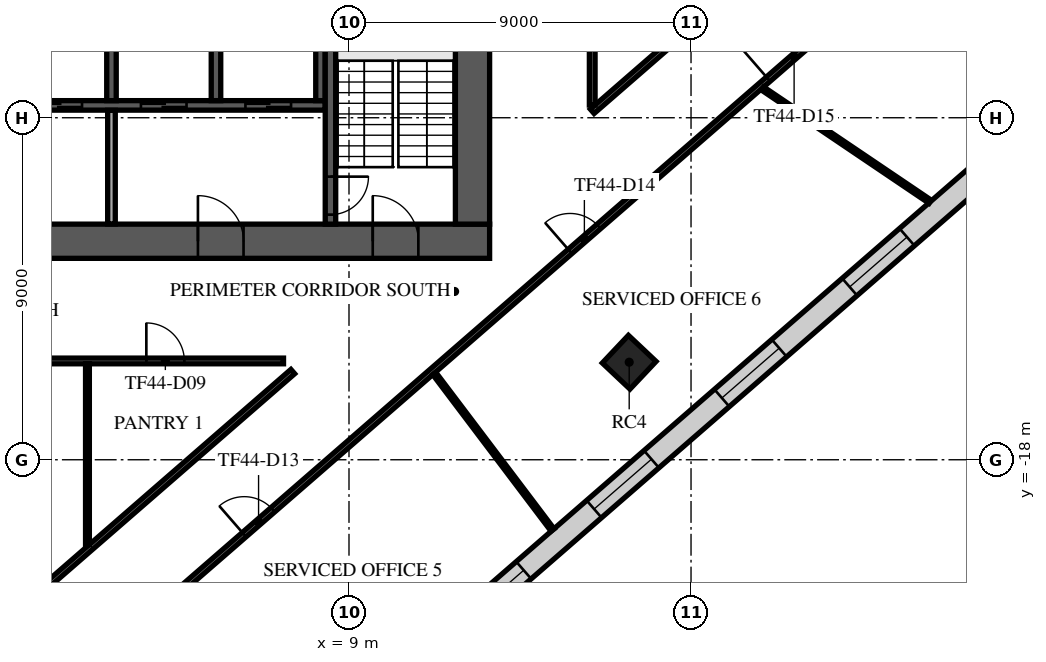
"""IFC4 building model, lengths in metres.
Left out: names, types, materials, properties, quantities, classifications, styles, units other than length and angle.
Written with IfcOpenShell. Run it as: python <this file> out.ifc"""

import sys

from ifc_helpers import new_model, si_unit, direction, frame, frame_2d, origin, origin_2d, place, context, subcontext, project, spatial, rectangle, extrude, element, fill, save


model = new_model("IFC4")
c1 = context("Model", 3, precision=1e-05, world=origin(), true_north=direction((0.0, 1.0)))
c2 = subcontext(c1, "Body", "Model", "MODEL_VIEW")
j1 = project(units=[si_unit("LENGTHUNIT", "METRE"), si_unit("PLANEANGLEUNIT", "RADIAN")], contexts=[c1])
p1 = place(None, origin())
s1 = spatial("IfcSite", under=j1, at=p1, CompositionType="ELEMENT")
p2 = place(p1, origin())
s2 = spatial("IfcBuilding", under=s1, at=p2, CompositionType="ELEMENT")
p3 = place(p2, frame((0.0, 0.0, 189.3)))
s3 = spatial("IfcBuildingStorey", under=s2, at=p3, CompositionType="ELEMENT", Elevation=189.3)
p4 = place(p3, frame((16.373, -15.433, -0.38), z_axis=(0.0, 0.0, 1.0), x_axis=(0.685916152371, 0.727680583715, 0.0)))
e1 = element("IfcColumn", 1, at=p4, inside=s3, PredefinedType="COLUMN", context=c2, shape_type="SweptSolid", body=[
    extrude(rectangle(XDim=1.0, YDim=1.0, at=origin_2d()), origin(), (0.0, 0.0, 1.0), 4.38),
])
p5 = place(p3, frame((-12.7, -12.25, 0.0), z_axis=(0.0, 0.0, 1.0), x_axis=(1.0, 0.0, 0.0)))
e2 = element("IfcWall", 2, at=p5, inside=s3, PredefinedType="SHEAR", context=c2, shape_type="SweptSolid", body=[
    extrude(rectangle(XDim=25.4, YDim=0.9, at=frame_2d((12.7, 0.0))), origin(), (0.0, 0.0, 1.0), 3.62),
])
p6 = place(p5, frame((7.6, 0.0, 0.0)))
e3 = element("IfcOpeningElement", 3, at=p6, cuts=e2, PredefinedType="OPENING", context=c2, shape_type="SweptSolid", body=[
    extrude(rectangle(XDim=2.0, YDim=2.1, at=frame_2d((1.0, 1.05))), frame((0.0, 0.46, 0.0), z_axis=(0.0, -1.0, 0.0), x_axis=(1.0, 0.0, 0.0)), (0.0, 0.0, 1.0), 0.92),
])
p7 = place(p5, frame((17.725, 0.0, 0.0)))
e4 = element("IfcOpeningElement", 4, at=p7, cuts=e2, PredefinedType="OPENING", context=c2, shape_type="SweptSolid", body=[
    extrude(rectangle(XDim=1.2, YDim=2.1, at=frame_2d((0.6, 1.05))), frame((0.0, 0.46, 0.0), z_axis=(0.0, -1.0, 0.0), x_axis=(1.0, 0.0, 0.0)), (0.0, 0.0, 1.0), 0.92),
])
p8 = place(p5, frame((1.875, 0.0, 0.0)))
e5 = element("IfcOpeningElement", 5, at=p8, cuts=e2, PredefinedType="OPENING", context=c2, shape_type="SweptSolid", body=[
    extrude(rectangle(XDim=1.2, YDim=2.1, at=frame_2d((0.6, 1.05))), frame((0.0, 0.46, 0.0), z_axis=(0.0, -1.0, 0.0), x_axis=(1.0, 0.0, 0.0)), (0.0, 0.0, 1.0), 0.92),
])
p9 = place(p5, frame((22.325, 0.0, 0.0)))
e6 = element("IfcOpeningElement", 6, at=p9, cuts=e2, PredefinedType="OPENING", context=c2, shape_type="SweptSolid", body=[
    extrude(rectangle(XDim=1.2, YDim=2.1, at=frame_2d((0.6, 1.05))), frame((0.0, 0.46, 0.0), z_axis=(0.0, -1.0, 0.0), x_axis=(1.0, 0.0, 0.0)), (0.0, 0.0, 1.0), 0.92),
])
p10 = place(p3, frame((12.25, -11.8, 0.0), z_axis=(0.0, 0.0, 1.0), x_axis=(0.0, 1.0, 0.0)))
e7 = element("IfcWall", 7, at=p10, inside=s3, PredefinedType="SHEAR", context=c2, shape_type="SweptSolid", body=[
    extrude(rectangle(XDim=23.6, YDim=0.9, at=frame_2d((11.8, 0.0))), origin(), (0.0, 0.0, 1.0), 3.62),
])
p11 = place(p10, frame((10.6, 0.0, 0.0)))
e8 = element("IfcOpeningElement", 8, at=p11, cuts=e7, PredefinedType="OPENING", context=c2, shape_type="SweptSolid", body=[
    extrude(rectangle(XDim=2.4, YDim=2.4, at=frame_2d((1.2, 1.2))), frame((0.0, 0.46, 0.0), z_axis=(0.0, -1.0, 0.0), x_axis=(1.0, 0.0, 0.0)), (0.0, 0.0, 1.0), 0.92),
])
p12 = place(p3, frame((-2.875, -8.675, 0.0), z_axis=(0.0, 0.0, 1.0), x_axis=(1.0, 0.0, 0.0)))
e9 = element("IfcWall", 9, at=p12, inside=s3, PredefinedType="SOLIDWALL", context=c2, shape_type="SweptSolid", body=[
    extrude(rectangle(XDim=11.25, YDim=0.25, at=frame_2d((5.625, 0.0))), origin(), (0.0, 0.0, 1.0), 3.62),
])
p13 = place(p12, frame((0.9, 0.0, 0.0)))
e10 = element("IfcOpeningElement", 10, at=p13, cuts=e9, PredefinedType="OPENING", context=c2, shape_type="SweptSolid", body=[
    extrude(rectangle(XDim=1.2, YDim=2.1, at=frame_2d((0.6, 1.05))), frame((0.0, 0.135, 0.0), z_axis=(0.0, -1.0, 0.0), x_axis=(1.0, 0.0, 0.0)), (0.0, 0.0, 1.0), 0.27),
])
p14 = place(p12, frame((3.65, 0.0, 0.0)))
e11 = element("IfcOpeningElement", 11, at=p14, cuts=e9, PredefinedType="OPENING", context=c2, shape_type="SweptSolid", body=[
    extrude(rectangle(XDim=1.2, YDim=2.1, at=frame_2d((0.6, 1.05))), frame((0.0, 0.135, 0.0), z_axis=(0.0, -1.0, 0.0), x_axis=(1.0, 0.0, 0.0)), (0.0, 0.0, 1.0), 0.27),
])
p15 = place(p12, frame((6.4, 0.0, 0.0)))
e12 = element("IfcOpeningElement", 12, at=p15, cuts=e9, PredefinedType="OPENING", context=c2, shape_type="SweptSolid", body=[
    extrude(rectangle(XDim=1.2, YDim=2.1, at=frame_2d((0.6, 1.05))), frame((0.0, 0.135, 0.0), z_axis=(0.0, -1.0, 0.0), x_axis=(1.0, 0.0, 0.0)), (0.0, 0.0, 1.0), 0.27),
])
p16 = place(p12, frame((9.15, 0.0, 0.0)))
e13 = element("IfcOpeningElement", 13, at=p16, cuts=e9, PredefinedType="OPENING", context=c2, shape_type="SweptSolid", body=[
    extrude(rectangle(XDim=1.2, YDim=2.1, at=frame_2d((0.6, 1.05))), frame((0.0, 0.135, 0.0), z_axis=(0.0, -1.0, 0.0), x_axis=(1.0, 0.0, 0.0)), (0.0, 0.0, 1.0), 0.27),
])
for number, where, z_axis, x_axis in (
    (14, (2.75, -8.55, 0.0), (0.0, 0.0, 1.0), (0.0, 1.0, 0.0)),
    (15, (5.5, -8.55, 0.0), (0.0, 0.0, 1.0), (0.0, 1.0, 0.0)),
    (16, (8.25, -8.55, 0.0), (0.0, 0.0, 1.0), (0.0, 1.0, 0.0)),
):
    element("IfcWall", number, at=place(p3, frame(where, z_axis=z_axis, x_axis=x_axis)), inside=s3, PredefinedType="SOLIDWALL", context=c2, shape_type="SweptSolid", body=[
        extrude(rectangle(XDim=2.7, YDim=0.25, at=frame_2d((1.35, 0.0))), origin(), (0.0, 0.0, 1.0), 3.62),
    ])
p17 = place(p3, frame((8.512, -4.55, 0.0), z_axis=(0.0, 0.0, 1.0), x_axis=(0.0, -1.0, 0.0)))
e17 = element("IfcWall", 17, at=p17, inside=s3, PredefinedType="SOLIDWALL", context=c2, shape_type="SweptSolid", body=[
    extrude(rectangle(XDim=7.25, YDim=0.275, at=frame_2d((3.625, 0.0))), origin(), (0.0, 0.0, 1.0), 3.62),
])
p18 = place(p17, frame((6.0, 0.0, 0.0)))
e18 = element("IfcOpeningElement", 18, at=p18, cuts=e17, PredefinedType="OPENING", context=c2, shape_type="SweptSolid", body=[
    extrude(rectangle(XDim=1.0, YDim=2.1, at=frame_2d((0.5, 1.05))), frame((0.0, 0.147, 0.0), z_axis=(0.0, -1.0, 0.0), x_axis=(1.0, 0.0, 0.0)), (0.0, 0.0, 1.0), 0.295),
])
p19 = place(p3, frame((2.75, -11.795, 0.0), z_axis=(0.0, 0.0, 1.0), x_axis=(0.0, 1.0, 0.0)))
e19 = element("IfcWall", 19, at=p19, inside=s3, PredefinedType="PARTITIONING", context=c2, shape_type="SweptSolid", body=[
    extrude(rectangle(XDim=2.99, YDim=0.2, at=frame_2d((1.495, 0.0))), origin(), (0.0, 0.0, 1.0), 3.62),
])
p20 = place(p3, frame((-2.286, -34.715, 0.0), z_axis=(0.0, 0.0, 1.0), x_axis=(0.754708272811, 0.656060532993, 0.0)))
e20 = element("IfcWall", 20, at=p20, inside=s3, PredefinedType="STANDARD", context=c2, shape_type="SweptSolid", body=[
    extrude(rectangle(XDim=49.0, YDim=0.6, at=frame_2d((24.5, 0.0))), origin(), (0.0, 0.0, 1.0), 3.62),
])
p21 = place(p20, frame((1.227, 0.0, 0.9)))
e21 = element("IfcOpeningElement", 21, at=p21, cuts=e20, PredefinedType="OPENING", context=c2, shape_type="SweptSolid", body=[
    extrude(rectangle(XDim=2.0, YDim=2.1, at=frame_2d((1.0, 1.05))), frame((0.0, 0.31, 0.0), z_axis=(0.0, -1.0, 0.0), x_axis=(1.0, 0.0, 0.0)), (0.0, 0.0, 1.0), 0.62),
])
p22 = place(p20, frame((5.682, 0.0, 0.9)))
e22 = element("IfcOpeningElement", 22, at=p22, cuts=e20, PredefinedType="OPENING", context=c2, shape_type="SweptSolid", body=[
    extrude(rectangle(XDim=2.0, YDim=2.1, at=frame_2d((1.0, 1.05))), frame((0.0, 0.31, 0.0), z_axis=(0.0, -1.0, 0.0), x_axis=(1.0, 0.0, 0.0)), (0.0, 0.0, 1.0), 0.62),
])
p23 = place(p20, frame((10.136, 0.0, 0.9)))
e23 = element("IfcOpeningElement", 23, at=p23, cuts=e20, PredefinedType="OPENING", context=c2, shape_type="SweptSolid", body=[
    extrude(rectangle(XDim=2.0, YDim=2.1, at=frame_2d((1.0, 1.05))), frame((0.0, 0.31, 0.0), z_axis=(0.0, -1.0, 0.0), x_axis=(1.0, 0.0, 0.0)), (0.0, 0.0, 1.0), 0.62),
])
p24 = place(p20, frame((14.591, 0.0, 0.9)))
e24 = element("IfcOpeningElement", 24, at=p24, cuts=e20, PredefinedType="OPENING", context=c2, shape_type="SweptSolid", body=[
    extrude(rectangle(XDim=2.0, YDim=2.1, at=frame_2d((1.0, 1.05))), frame((0.0, 0.31, 0.0), z_axis=(0.0, -1.0, 0.0), x_axis=(1.0, 0.0, 0.0)), (0.0, 0.0, 1.0), 0.62),
])
p25 = place(p20, frame((19.045, 0.0, 0.9)))
e25 = element("IfcOpeningElement", 25, at=p25, cuts=e20, PredefinedType="OPENING", context=c2, shape_type="SweptSolid", body=[
    extrude(rectangle(XDim=2.0, YDim=2.1, at=frame_2d((1.0, 1.05))), frame((0.0, 0.31, 0.0), z_axis=(0.0, -1.0, 0.0), x_axis=(1.0, 0.0, 0.0)), (0.0, 0.0, 1.0), 0.62),
])
p26 = place(p20, frame((23.5, 0.0, 0.9)))
e26 = element("IfcOpeningElement", 26, at=p26, cuts=e20, PredefinedType="OPENING", context=c2, shape_type="SweptSolid", body=[
    extrude(rectangle(XDim=2.0, YDim=2.1, at=frame_2d((1.0, 1.05))), frame((0.0, 0.31, 0.0), z_axis=(0.0, -1.0, 0.0), x_axis=(1.0, 0.0, 0.0)), (0.0, 0.0, 1.0), 0.62),
])
p27 = place(p20, frame((27.955, 0.0, 0.9)))
e27 = element("IfcOpeningElement", 27, at=p27, cuts=e20, PredefinedType="OPENING", context=c2, shape_type="SweptSolid", body=[
    extrude(rectangle(XDim=2.0, YDim=2.1, at=frame_2d((1.0, 1.05))), frame((0.0, 0.31, 0.0), z_axis=(0.0, -1.0, 0.0), x_axis=(1.0, 0.0, 0.0)), (0.0, 0.0, 1.0), 0.62),
])
p28 = place(p20, frame((32.409, 0.0, 0.9)))
e28 = element("IfcOpeningElement", 28, at=p28, cuts=e20, PredefinedType="OPENING", context=c2, shape_type="SweptSolid", body=[
    extrude(rectangle(XDim=2.0, YDim=2.1, at=frame_2d((1.0, 1.05))), frame((0.0, 0.31, 0.0), z_axis=(0.0, -1.0, 0.0), x_axis=(1.0, 0.0, 0.0)), (0.0, 0.0, 1.0), 0.62),
])
p29 = place(p20, frame((36.864, 0.0, 0.9)))
e29 = element("IfcOpeningElement", 29, at=p29, cuts=e20, PredefinedType="OPENING", context=c2, shape_type="SweptSolid", body=[
    extrude(rectangle(XDim=2.0, YDim=2.1, at=frame_2d((1.0, 1.05))), frame((0.0, 0.31, 0.0), z_axis=(0.0, -1.0, 0.0), x_axis=(1.0, 0.0, 0.0)), (0.0, 0.0, 1.0), 0.62),
])
p30 = place(p20, frame((41.318, 0.0, 0.9)))
e30 = element("IfcOpeningElement", 30, at=p30, cuts=e20, PredefinedType="OPENING", context=c2, shape_type="SweptSolid", body=[
    extrude(rectangle(XDim=2.0, YDim=2.1, at=frame_2d((1.0, 1.05))), frame((0.0, 0.31, 0.0), z_axis=(0.0, -1.0, 0.0), x_axis=(1.0, 0.0, 0.0)), (0.0, 0.0, 1.0), 0.62),
])
p31 = place(p20, frame((45.773, 0.0, 0.9)))
e31 = element("IfcOpeningElement", 31, at=p31, cuts=e20, PredefinedType="OPENING", context=c2, shape_type="SweptSolid", body=[
    extrude(rectangle(XDim=2.0, YDim=2.1, at=frame_2d((1.0, 1.05))), frame((0.0, 0.31, 0.0), z_axis=(0.0, -1.0, 0.0), x_axis=(1.0, 0.0, 0.0)), (0.0, 0.0, 1.0), 0.62),
])
p32 = place(p3, frame((-10.486, -15.4, 0.0), z_axis=(0.0, 0.0, 1.0), x_axis=(1.0, 0.0, 0.0)))
e32 = element("IfcWall", 32, at=p32, inside=s3, PredefinedType="PARTITIONING", context=c2, shape_type="SweptSolid", body=[
    extrude(rectangle(XDim=17.763, YDim=0.15, at=frame_2d((8.882, 0.0))), origin(), (0.0, 0.0, 1.0), 3.17),
])
p33 = place(p32, frame((14.154, 0.0, 0.0)))
e33 = element("IfcOpeningElement", 33, at=p33, cuts=e32, PredefinedType="OPENING", context=c2, shape_type="SweptSolid", body=[
    extrude(rectangle(XDim=1.0, YDim=2.1, at=frame_2d((0.5, 1.05))), frame((0.0, 0.085, 0.0), z_axis=(0.0, -1.0, 0.0), x_axis=(1.0, 0.0, 0.0)), (0.0, 0.0, 1.0), 0.17),
])
p34 = place(p3, frame((-2.631, -24.505, 0.0), z_axis=(0.0, 0.0, 1.0), x_axis=(0.754714526528, 0.656053338874, 0.0)))
e34 = element("IfcWall", 34, at=p34, inside=s3, PredefinedType="PARTITIONING", context=c2, shape_type="SweptSolid", body=[
    extrude(rectangle(XDim=13.452, YDim=0.15, at=frame_2d((6.726, 0.0))), origin(), (0.0, 0.0, 1.0), 3.17),
])
p35 = place(p34, frame((3.05, 0.0, 0.0)))
e35 = element("IfcOpeningElement", 35, at=p35, cuts=e34, PredefinedType="OPENING", context=c2, shape_type="SweptSolid", body=[
    extrude(rectangle(XDim=1.0, YDim=2.1, at=frame_2d((0.5, 1.05))), frame((0.0, 0.085, 0.0), z_axis=(0.0, -1.0, 0.0), x_axis=(1.0, 0.0, 0.0)), (0.0, 0.0, 1.0), 0.17),
])
p36 = place(p3, frame((-1.0, -26.268, 0.0), z_axis=(0.0, 0.0, 1.0), x_axis=(0.754711356604, 0.656056985492, 0.0)))
e36 = element("IfcWall", 36, at=p36, inside=s3, PredefinedType="PARTITIONING", context=c2, shape_type="SweptSolid", body=[
    extrude(rectangle(XDim=36.052, YDim=0.15, at=frame_2d((18.026, 0.0))), origin(), (0.0, 0.0, 1.0), 3.17),
])
p37 = place(p36, frame((9.598, 0.0, 0.0)))
e37 = element("IfcOpeningElement", 37, at=p37, cuts=e36, PredefinedType="OPENING", context=c2, shape_type="SweptSolid", body=[
    extrude(rectangle(XDim=1.0, YDim=2.1, at=frame_2d((0.5, 1.05))), frame((0.0, 0.085, 0.0), z_axis=(0.0, -1.0, 0.0), x_axis=(1.0, 0.0, 0.0)), (0.0, 0.0, 1.0), 0.17),
])
p38 = place(p36, frame((20.957, 0.0, 0.0)))
e38 = element("IfcOpeningElement", 38, at=p38, cuts=e36, PredefinedType="OPENING", context=c2, shape_type="SweptSolid", body=[
    extrude(rectangle(XDim=1.0, YDim=2.1, at=frame_2d((0.5, 1.05))), frame((0.0, 0.085, 0.0), z_axis=(0.0, -1.0, 0.0), x_axis=(1.0, 0.0, 0.0)), (0.0, 0.0, 1.0), 0.17),
])
p39 = place(p36, frame((27.87, 0.0, 0.0)))
e39 = element("IfcOpeningElement", 39, at=p39, cuts=e36, PredefinedType="OPENING", context=c2, shape_type="SweptSolid", body=[
    extrude(rectangle(XDim=1.8, YDim=2.1, at=frame_2d((0.9, 1.05))), frame((0.0, 0.085, 0.0), z_axis=(0.0, -1.0, 0.0), x_axis=(1.0, 0.0, 0.0)), (0.0, 0.0, 1.0), 0.17),
])
p40 = place(p3, frame((15.4, -8.831, 0.0), z_axis=(0.0, 0.0, 1.0), x_axis=(0.754715065445, 0.656052718911, 0.0)))
e40 = element("IfcWall", 40, at=p40, inside=s3, PredefinedType="PARTITIONING", context=c2, shape_type="SweptSolid", body=[
    extrude(rectangle(XDim=12.234, YDim=0.15, at=frame_2d((6.117, 0.0))), origin(), (0.0, 0.0, 1.0), 3.17),
])
p41 = place(p40, frame((8.8, 0.0, 0.0)))
e41 = element("IfcOpeningElement", 41, at=p41, cuts=e40, PredefinedType="OPENING", context=c2, shape_type="SweptSolid", body=[
    extrude(rectangle(XDim=1.0, YDim=2.1, at=frame_2d((0.5, 1.05))), frame((0.0, 0.085, 0.0), z_axis=(0.0, -1.0, 0.0), x_axis=(1.0, 0.0, 0.0)), (0.0, 0.0, 1.0), 0.17),
])
p42 = place(p3, frame((15.4, -8.667, 0.0), z_axis=(0.0, 0.0, 1.0), x_axis=(0.0, 1.0, 0.0)))
e42 = element("IfcWall", 42, at=p42, inside=s3, PredefinedType="PARTITIONING", context=c2, shape_type="SweptSolid", body=[
    extrude(rectangle(XDim=15.944, YDim=0.15, at=frame_2d((7.972, 0.0))), origin(), (0.0, 0.0, 1.0), 3.17),
])
p43 = place(p3, frame((2.118, -20.234, 0.0), z_axis=(0.0, 0.0, 1.0), x_axis=(0.0, 1.0, 0.0)))
e43 = element("IfcWall", 43, at=p43, inside=s3, PredefinedType="PARTITIONING", context=c2, shape_type="SweptSolid", body=[
    extrude(rectangle(XDim=4.759, YDim=0.1, at=frame_2d((2.379, 0.0))), origin(), (0.0, 0.0, 1.0), 3.17),
])
p44 = place(p3, frame((11.243, -15.729, 0.0), z_axis=(0.0, 0.0, 1.0), x_axis=(0.602848474471, -0.797855699251, 0.0)))
e44 = element("IfcWall", 44, at=p44, inside=s3, PredefinedType="PARTITIONING", context=c2, shape_type="SweptSolid", body=[
    extrude(rectangle(XDim=5.163, YDim=0.1, at=frame_2d((2.582, 0.0))), origin(), (0.0, 0.0, 1.0), 3.17),
])
p45 = place(p3, frame((19.882, -8.231, 0.0), z_axis=(0.0, 0.0, 1.0), x_axis=(0.828654525471, -0.559760374997, 0.0)))
e45 = element("IfcWall", 45, at=p45, inside=s3, PredefinedType="PARTITIONING", context=c2, shape_type="SweptSolid", body=[
    extrude(rectangle(XDim=5.322, YDim=0.1, at=frame_2d((2.661, 0.0))), origin(), (0.0, 0.0, 1.0), 3.62),
])
p46 = place(p7, origin())
e46 = element("IfcDoor", 46, at=p46, inside=s3, OperationType="SINGLE_SWING_LEFT", PredefinedType="DOOR", context=c2, shape_type="SweptSolid", body=[
    extrude(rectangle(XDim=1.2, YDim=2.1, at=frame_2d((0.6, 1.05))), frame((0.0, 0.025, 0.0), z_axis=(0.0, -1.0, 0.0), x_axis=(1.0, 0.0, 0.0)), (0.0, 0.0, 1.0), 0.05),
])
fill(e4, e46)
p47 = place(p9, origin())
e47 = element("IfcDoor", 47, at=p47, inside=s3, OperationType="SINGLE_SWING_LEFT", PredefinedType="DOOR", context=c2, shape_type="SweptSolid", body=[
    extrude(rectangle(XDim=1.2, YDim=2.1, at=frame_2d((0.6, 1.05))), frame((0.0, 0.025, 0.0), z_axis=(0.0, -1.0, 0.0), x_axis=(1.0, 0.0, 0.0)), (0.0, 0.0, 1.0), 0.05),
])
fill(e6, e47)
p48 = place(p14, origin())
e48 = element("IfcDoor", 48, at=p48, inside=s3, OperationType="DOUBLE_DOOR_SLIDING", PredefinedType="DOOR", context=c2, shape_type="SweptSolid", body=[
    extrude(rectangle(XDim=1.2, YDim=2.1, at=frame_2d((0.6, 1.05))), frame((0.0, 0.025, 0.0), z_axis=(0.0, -1.0, 0.0), x_axis=(1.0, 0.0, 0.0)), (0.0, 0.0, 1.0), 0.05),
])
fill(e11, e48)
p49 = place(p15, origin())
e49 = element("IfcDoor", 49, at=p49, inside=s3, OperationType="DOUBLE_DOOR_SLIDING", PredefinedType="DOOR", context=c2, shape_type="SweptSolid", body=[
    extrude(rectangle(XDim=1.2, YDim=2.1, at=frame_2d((0.6, 1.05))), frame((0.0, 0.025, 0.0), z_axis=(0.0, -1.0, 0.0), x_axis=(1.0, 0.0, 0.0)), (0.0, 0.0, 1.0), 0.05),
])
fill(e12, e49)
p50 = place(p16, origin())
e50 = element("IfcDoor", 50, at=p50, inside=s3, OperationType="DOUBLE_DOOR_SLIDING", PredefinedType="DOOR", context=c2, shape_type="SweptSolid", body=[
    extrude(rectangle(XDim=1.2, YDim=2.1, at=frame_2d((0.6, 1.05))), frame((0.0, 0.025, 0.0), z_axis=(0.0, -1.0, 0.0), x_axis=(1.0, 0.0, 0.0)), (0.0, 0.0, 1.0), 0.05),
])
fill(e13, e50)
p51 = place(p18, origin())
e51 = element("IfcDoor", 51, at=p51, inside=s3, OperationType="SINGLE_SWING_LEFT", PredefinedType="DOOR", context=c2, shape_type="SweptSolid", body=[
    extrude(rectangle(XDim=1.0, YDim=2.1, at=frame_2d((0.5, 1.05))), frame((0.0, 0.025, 0.0), z_axis=(0.0, -1.0, 0.0), x_axis=(1.0, 0.0, 0.0)), (0.0, 0.0, 1.0), 0.05),
])
fill(e18, e51)
p52 = place(p25, origin())
e52 = element("IfcWindow", 52, at=p52, inside=s3, PartitioningType="SINGLE_PANEL", PredefinedType="WINDOW", context=c2, shape_type="SweptSolid", body=[
    extrude(rectangle(XDim=2.0, YDim=2.1, at=frame_2d((1.0, 1.05))), frame((0.0, 0.03, 0.0), z_axis=(0.0, -1.0, 0.0), x_axis=(1.0, 0.0, 0.0)), (0.0, 0.0, 1.0), 0.06),
])
fill(e25, e52)
p53 = place(p26, origin())
e53 = element("IfcWindow", 53, at=p53, inside=s3, PartitioningType="SINGLE_PANEL", PredefinedType="WINDOW", context=c2, shape_type="SweptSolid", body=[
    extrude(rectangle(XDim=2.0, YDim=2.1, at=frame_2d((1.0, 1.05))), frame((0.0, 0.03, 0.0), z_axis=(0.0, -1.0, 0.0), x_axis=(1.0, 0.0, 0.0)), (0.0, 0.0, 1.0), 0.06),
])
fill(e26, e53)
p54 = place(p27, origin())
e54 = element("IfcWindow", 54, at=p54, inside=s3, PartitioningType="SINGLE_PANEL", PredefinedType="WINDOW", context=c2, shape_type="SweptSolid", body=[
    extrude(rectangle(XDim=2.0, YDim=2.1, at=frame_2d((1.0, 1.05))), frame((0.0, 0.03, 0.0), z_axis=(0.0, -1.0, 0.0), x_axis=(1.0, 0.0, 0.0)), (0.0, 0.0, 1.0), 0.06),
])
fill(e27, e54)
p55 = place(p28, origin())
e55 = element("IfcWindow", 55, at=p55, inside=s3, PartitioningType="SINGLE_PANEL", PredefinedType="WINDOW", context=c2, shape_type="SweptSolid", body=[
    extrude(rectangle(XDim=2.0, YDim=2.1, at=frame_2d((1.0, 1.05))), frame((0.0, 0.03, 0.0), z_axis=(0.0, -1.0, 0.0), x_axis=(1.0, 0.0, 0.0)), (0.0, 0.0, 1.0), 0.06),
])
fill(e28, e55)
p56 = place(p33, frame((1.0, 0.0, 0.0), z_axis=(0.0, 0.0, 1.0), x_axis=(-1.0, 0.0, 0.0)))
e56 = element("IfcDoor", 56, at=p56, inside=s3, OperationType="SINGLE_SWING_LEFT", PredefinedType="DOOR", context=c2, shape_type="SweptSolid", body=[
    extrude(rectangle(XDim=1.0, YDim=2.1, at=frame_2d((0.5, 1.05))), frame((0.0, 0.025, 0.0), z_axis=(0.0, -1.0, 0.0), x_axis=(1.0, 0.0, 0.0)), (0.0, 0.0, 1.0), 0.05),
])
fill(e33, e56)
p57 = place(p37, frame((1.0, 0.0, 0.0), z_axis=(0.0, 0.0, 1.0), x_axis=(-1.0, 0.0, 0.0)))
e57 = element("IfcDoor", 57, at=p57, inside=s3, OperationType="SINGLE_SWING_LEFT", PredefinedType="DOOR", context=c2, shape_type="SweptSolid", body=[
    extrude(rectangle(XDim=1.0, YDim=2.1, at=frame_2d((0.5, 1.05))), frame((0.0, 0.025, 0.0), z_axis=(0.0, -1.0, 0.0), x_axis=(1.0, 0.0, 0.0)), (0.0, 0.0, 1.0), 0.05),
])
fill(e37, e57)
p58 = place(p38, frame((1.0, 0.0, 0.0), z_axis=(0.0, 0.0, 1.0), x_axis=(-1.0, 0.0, 0.0)))
e58 = element("IfcDoor", 58, at=p58, inside=s3, OperationType="SINGLE_SWING_LEFT", PredefinedType="DOOR", context=c2, shape_type="SweptSolid", body=[
    extrude(rectangle(XDim=1.0, YDim=2.1, at=frame_2d((0.5, 1.05))), frame((0.0, 0.025, 0.0), z_axis=(0.0, -1.0, 0.0), x_axis=(1.0, 0.0, 0.0)), (0.0, 0.0, 1.0), 0.05),
])
fill(e38, e58)
p59 = place(p39, frame((1.8, 0.0, 0.0), z_axis=(0.0, 0.0, 1.0), x_axis=(-1.0, 0.0, 0.0)))
e59 = element("IfcDoor", 59, at=p59, inside=s3, OperationType="DOUBLE_DOOR_SINGLE_SWING", PredefinedType="DOOR", context=c2, shape_type="SweptSolid", body=[
    extrude(rectangle(XDim=1.8, YDim=2.1, at=frame_2d((0.9, 1.05))), frame((0.0, 0.025, 0.0), z_axis=(0.0, -1.0, 0.0), x_axis=(1.0, 0.0, 0.0)), (0.0, 0.0, 1.0), 0.05),
])
fill(e39, e59)
save(model, sys.argv[1])
